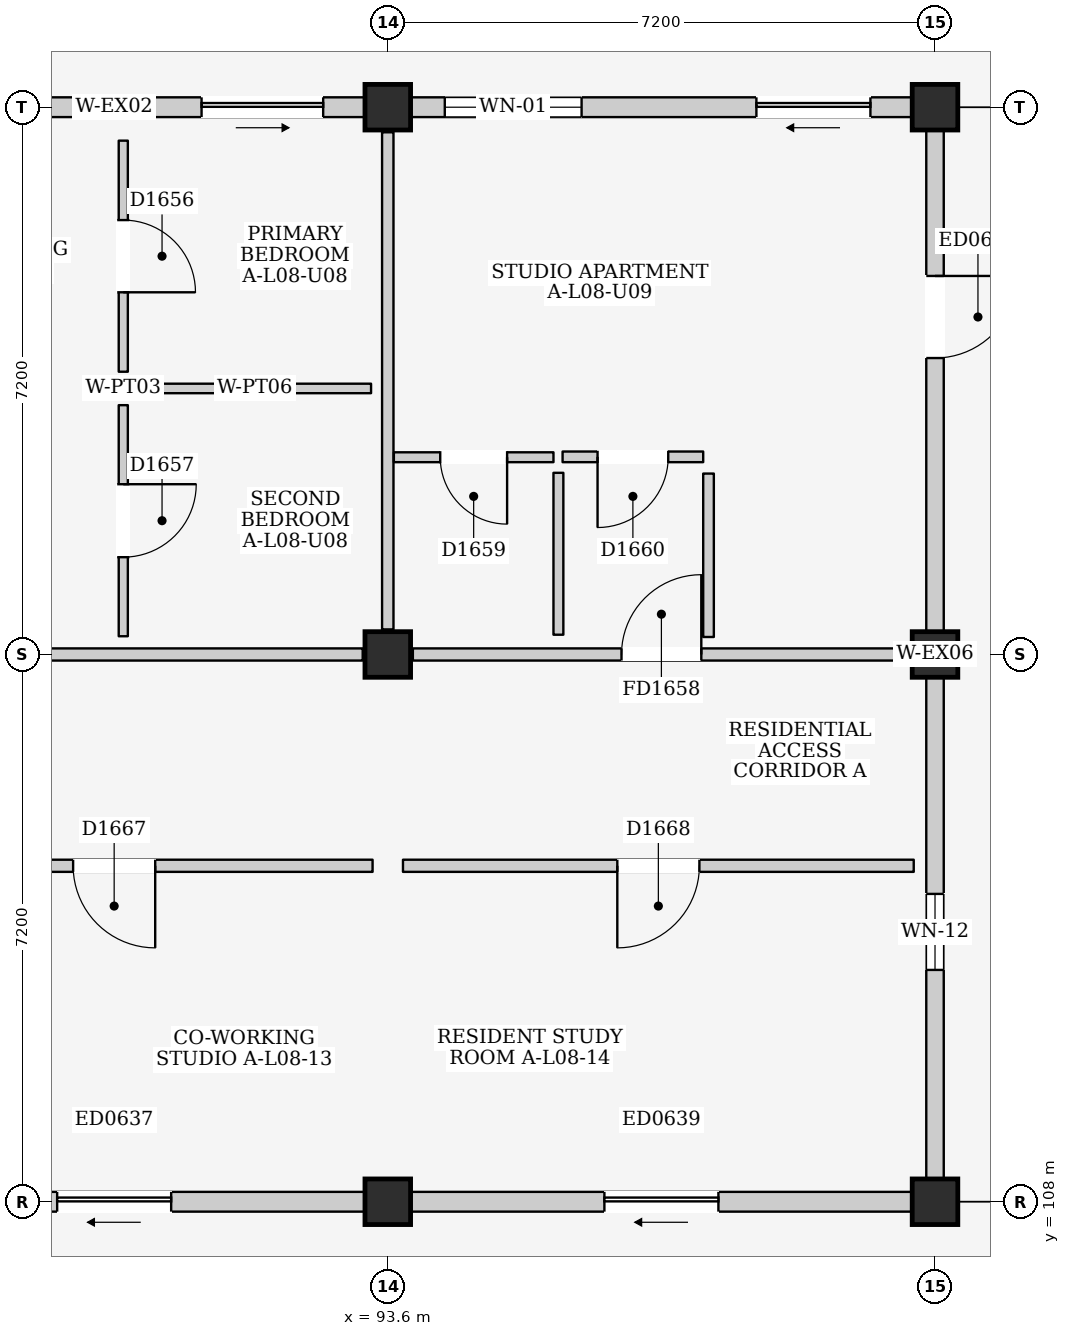
"""IFC4 building model, lengths in metres.
Left out: names, types, materials, properties, quantities, classifications, styles, units other than length and angle.
Written with IfcOpenShell. Run it as: python <this file> out.ifc"""

import sys

from ifc_helpers import new_model, si_unit, direction, frame, frame_2d, origin, origin_2d, place, context, subcontext, project, spatial, rectangle, extrude, element, fill, save


model = new_model("IFC4")
c1 = context("Model", 3, precision=1e-05, world=origin(), true_north=direction((0.0, 1.0)))
c2 = subcontext(c1, "Body", "Model", "MODEL_VIEW")
j1 = project(units=[si_unit("LENGTHUNIT", "METRE"), si_unit("PLANEANGLEUNIT", "RADIAN")], contexts=[c1])
p1 = place(None, origin())
s1 = spatial("IfcSite", under=j1, at=p1, CompositionType="ELEMENT")
p2 = place(p1, origin())
s2 = spatial("IfcBuilding", under=s1, at=p2, CompositionType="ELEMENT")
p3 = place(p2, frame((0.0, 0.0, 28.3)))
s3 = spatial("IfcBuildingStorey", under=s2, at=p3, CompositionType="ELEMENT", Elevation=28.3)
for number, where, z_axis, x_axis in (
    (1, (93.6, 108.0, 0.0), (0.0, 0.0, 1.0), (1.0, 0.0, 0.0)),
    (2, (93.6, 115.2, 0.0), (0.0, 0.0, 1.0), (1.0, 0.0, 0.0)),
    (3, (93.6, 122.4, 0.0), (0.0, 0.0, 1.0), (1.0, 0.0, 0.0)),
    (4, (100.8, 108.0, 0.0), (0.0, 0.0, 1.0), (1.0, 0.0, 0.0)),
    (5, (100.8, 115.2, 0.0), (0.0, 0.0, 1.0), (1.0, 0.0, 0.0)),
    (6, (100.8, 122.4, 0.0), (0.0, 0.0, 1.0), (1.0, 0.0, 0.0)),
):
    element("IfcColumn", number, at=place(p3, frame(where, z_axis=z_axis, x_axis=x_axis)), inside=s3, PredefinedType="COLUMN", context=c2, shape_type="SweptSolid", body=[
        extrude(rectangle(XDim=0.6, YDim=0.6, at=origin_2d()), origin(), (0.0, 0.0, 1.0), 3.2),
    ])
p4 = place(p3, frame((86.7, 122.4, 0.0), z_axis=(0.0, 0.0, 1.0), x_axis=(1.0, 0.0, 0.0)))
e7 = element("IfcWall", 7, at=p4, inside=s3, PredefinedType="ELEMENTEDWALL", context=c2, shape_type="SweptSolid", body=[
    extrude(rectangle(XDim=6.6, YDim=0.26, at=frame_2d((3.3, 0.0))), origin(), (0.0, 0.0, 1.0), 2.485),
])
p5 = place(p4, frame((4.45, 0.0, 0.0)))
e8 = element("IfcOpeningElement", 8, at=p5, cuts=e7, PredefinedType="OPENING", context=c2, shape_type="SweptSolid", body=[
    extrude(rectangle(XDim=1.6, YDim=2.12, at=frame_2d((0.8, 1.06))), frame((0.0, 0.145, 0.0), z_axis=(0.0, -1.0, 0.0), x_axis=(1.0, 0.0, 0.0)), (0.0, 0.0, 1.0), 0.29),
])
p6 = place(p4, frame((0.45, 0.0, 0.825)))
e9 = element("IfcOpeningElement", 9, at=p6, cuts=e7, PredefinedType="OPENING", context=c2, shape_type="SweptSolid", body=[
    extrude(rectangle(XDim=1.75, YDim=1.55, at=frame_2d((0.875, 0.775))), frame((0.0, 0.145, 0.0), z_axis=(0.0, -1.0, 0.0), x_axis=(1.0, 0.0, 0.0)), (0.0, 0.0, 1.0), 0.29),
])
p7 = place(p3, frame((86.7, 108.0, 0.0), z_axis=(0.0, 0.0, 1.0), x_axis=(1.0, 0.0, 0.0)))
e10 = element("IfcWall", 10, at=p7, inside=s3, PredefinedType="ELEMENTEDWALL", context=c2, shape_type="SweptSolid", body=[
    extrude(rectangle(XDim=6.6, YDim=0.26, at=frame_2d((3.3, 0.0))), origin(), (0.0, 0.0, 1.0), 2.285),
])
p8 = place(p7, frame((2.55, 0.0, 0.0)))
e11 = element("IfcOpeningElement", 11, at=p8, cuts=e10, PredefinedType="OPENING", context=c2, shape_type="SweptSolid", body=[
    extrude(rectangle(XDim=1.5, YDim=2.12, at=frame_2d((0.75, 1.06))), frame((0.0, 0.145, 0.0), z_axis=(0.0, -1.0, 0.0), x_axis=(1.0, 0.0, 0.0)), (0.0, 0.0, 1.0), 0.29),
])
p9 = place(p3, frame((93.9, 122.4, 0.0), z_axis=(0.0, 0.0, 1.0), x_axis=(1.0, 0.0, 0.0)))
e12 = element("IfcWall", 12, at=p9, inside=s3, PredefinedType="ELEMENTEDWALL", context=c2, shape_type="SweptSolid", body=[
    extrude(rectangle(XDim=6.6, YDim=0.26, at=frame_2d((3.3, 0.0))), origin(), (0.0, 0.0, 1.0), 2.485),
])
p10 = place(p9, frame((4.55, 0.0, 0.0)))
e13 = element("IfcOpeningElement", 13, at=p10, cuts=e12, PredefinedType="OPENING", context=c2, shape_type="SweptSolid", body=[
    extrude(rectangle(XDim=1.5, YDim=2.12, at=frame_2d((0.75, 1.06))), frame((0.0, 0.145, 0.0), z_axis=(0.0, -1.0, 0.0), x_axis=(1.0, 0.0, 0.0)), (0.0, 0.0, 1.0), 0.29),
])
p11 = place(p9, frame((0.45, 0.0, 0.875)))
e14 = element("IfcOpeningElement", 14, at=p11, cuts=e12, PredefinedType="OPENING", context=c2, shape_type="SweptSolid", body=[
    extrude(rectangle(XDim=1.8, YDim=1.5, at=frame_2d((0.9, 0.75))), frame((0.0, 0.145, 0.0), z_axis=(0.0, -1.0, 0.0), x_axis=(1.0, 0.0, 0.0)), (0.0, 0.0, 1.0), 0.29),
])
p12 = place(p3, frame((93.9, 108.0, 0.0), z_axis=(0.0, 0.0, 1.0), x_axis=(1.0, 0.0, 0.0)))
e15 = element("IfcWall", 15, at=p12, inside=s3, PredefinedType="ELEMENTEDWALL", context=c2, shape_type="SweptSolid", body=[
    extrude(rectangle(XDim=6.6, YDim=0.26, at=frame_2d((3.3, 0.0))), origin(), (0.0, 0.0, 1.0), 2.285),
])
p13 = place(p12, frame((2.55, 0.0, 0.0)))
e16 = element("IfcOpeningElement", 16, at=p13, cuts=e15, PredefinedType="OPENING", context=c2, shape_type="SweptSolid", body=[
    extrude(rectangle(XDim=1.5, YDim=2.12, at=frame_2d((0.75, 1.06))), frame((0.0, 0.145, 0.0), z_axis=(0.0, -1.0, 0.0), x_axis=(1.0, 0.0, 0.0)), (0.0, 0.0, 1.0), 0.29),
])
p14 = place(p3, frame((100.8, 108.3, 0.0), z_axis=(0.0, 0.0, 1.0), x_axis=(0.0, 1.0, 0.0)))
e17 = element("IfcWall", 17, at=p14, inside=s3, PredefinedType="ELEMENTEDWALL", context=c2, shape_type="SweptSolid", body=[
    extrude(rectangle(XDim=6.6, YDim=0.23, at=frame_2d((3.3, 0.0))), origin(), (0.0, 0.0, 1.0), 2.435),
])
p15 = place(p14, frame((2.75, 0.0, 1.1)))
e18 = element("IfcOpeningElement", 18, at=p15, cuts=e17, PredefinedType="OPENING", context=c2, shape_type="SweptSolid", body=[
    extrude(rectangle(XDim=1.0, YDim=0.9, at=frame_2d((0.5, 0.45))), frame((0.0, 0.13, 0.0), z_axis=(0.0, -1.0, 0.0), x_axis=(1.0, 0.0, 0.0)), (0.0, 0.0, 1.0), 0.26),
])
p16 = place(p3, frame((100.8, 115.5, 0.0), z_axis=(0.0, 0.0, 1.0), x_axis=(0.0, 1.0, 0.0)))
e19 = element("IfcWall", 19, at=p16, inside=s3, PredefinedType="ELEMENTEDWALL", context=c2, shape_type="SweptSolid", body=[
    extrude(rectangle(XDim=6.6, YDim=0.23, at=frame_2d((3.3, 0.0))), origin(), (0.0, 0.0, 1.0), 2.435),
])
p17 = place(p16, frame((3.6, 0.0, 0.0)))
e20 = element("IfcOpeningElement", 20, at=p17, cuts=e19, PredefinedType="OPENING", context=c2, shape_type="SweptSolid", body=[
    extrude(rectangle(XDim=1.08, YDim=2.12, at=frame_2d((0.54, 1.06))), frame((0.0, 0.13, 0.0), z_axis=(0.0, -1.0, 0.0), x_axis=(1.0, 0.0, 0.0)), (0.0, 0.0, 1.0), 0.26),
])
p18 = place(p3, frame((86.73, 115.2, 0.0), z_axis=(0.0, 0.0, 1.0), x_axis=(1.0, 0.0, 0.0)))
e21 = element("IfcWall", 21, at=p18, inside=s3, PredefinedType="PARTITIONING", context=c2, shape_type="SweptSolid", body=[
    extrude(rectangle(XDim=6.54, YDim=0.16, at=frame_2d((3.27, 0.0))), origin(), (0.0, 0.0, 1.0), 2.285),
])
p19 = place(p3, frame((93.6, 115.53, 0.0), z_axis=(0.0, 0.0, 1.0), x_axis=(0.0, 1.0, 0.0)))
e22 = element("IfcWall", 22, at=p19, inside=s3, PredefinedType="PARTITIONING", context=c2, shape_type="SweptSolid", body=[
    extrude(rectangle(XDim=6.54, YDim=0.15, at=frame_2d((3.27, 0.0))), origin(), (0.0, 0.0, 1.0), 2.435),
])
p20 = place(p3, frame((90.12, 118.92, 0.0), z_axis=(0.0, 0.0, 1.0), x_axis=(0.0, 1.0, 0.0)))
e23 = element("IfcWall", 23, at=p20, inside=s3, PredefinedType="PARTITIONING", context=c2, shape_type="SweptSolid", body=[
    extrude(rectangle(XDim=3.04, YDim=0.12, at=frame_2d((1.52, 0.0))), origin(), (0.0, 0.0, 1.0), 2.95),
])
p21 = place(p20, frame((1.045, 0.0, 0.0)))
e24 = element("IfcOpeningElement", 24, at=p21, cuts=e23, PredefinedType="OPENING", context=c2, shape_type="SweptSolid", body=[
    extrude(rectangle(XDim=0.95, YDim=2.15, at=frame_2d((0.475, 1.075))), frame((0.0, 0.075, 0.0), z_axis=(0.0, -1.0, 0.0), x_axis=(1.0, 0.0, 0.0)), (0.0, 0.0, 1.0), 0.15),
])
p22 = place(p3, frame((90.32, 118.7, 0.0), z_axis=(0.0, 0.0, 1.0), x_axis=(1.0, 0.0, 0.0)))
e25 = element("IfcWall", 25, at=p22, inside=s3, PredefinedType="PARTITIONING", context=c2, shape_type="SweptSolid", body=[
    extrude(rectangle(XDim=3.06, YDim=0.125, at=frame_2d((1.53, 0.0))), origin(), (0.0, 0.0, 1.0), 2.95),
])
p23 = place(p3, frame((90.12, 115.44, 0.0), z_axis=(0.0, 0.0, 1.0), x_axis=(0.0, 1.0, 0.0)))
e26 = element("IfcWall", 26, at=p23, inside=s3, PredefinedType="PARTITIONING", context=c2, shape_type="SweptSolid", body=[
    extrude(rectangle(XDim=3.04, YDim=0.12, at=frame_2d((1.52, 0.0))), origin(), (0.0, 0.0, 1.0), 2.95),
])
p24 = place(p23, frame((1.04, 0.0, 0.0)))
e27 = element("IfcOpeningElement", 27, at=p24, cuts=e26, PredefinedType="OPENING", context=c2, shape_type="SweptSolid", body=[
    extrude(rectangle(XDim=0.96, YDim=2.15, at=frame_2d((0.48, 1.075))), frame((0.0, 0.075, 0.0), z_axis=(0.0, -1.0, 0.0), x_axis=(1.0, 0.0, 0.0)), (0.0, 0.0, 1.0), 0.15),
])
p25 = place(p3, frame((93.93, 115.2, 0.0), z_axis=(0.0, 0.0, 1.0), x_axis=(1.0, 0.0, 0.0)))
e28 = element("IfcWall", 28, at=p25, inside=s3, PredefinedType="PARTITIONING", context=c2, shape_type="SweptSolid", body=[
    extrude(rectangle(XDim=6.54, YDim=0.16, at=frame_2d((3.27, 0.0))), origin(), (0.0, 0.0, 1.0), 2.285),
])
p26 = place(p25, frame((2.745, 0.0, 0.0)))
e29 = element("IfcOpeningElement", 29, at=p26, cuts=e28, PredefinedType="OPENING", context=c2, shape_type="SweptSolid", body=[
    extrude(rectangle(XDim=1.05, YDim=2.15, at=frame_2d((0.525, 1.075))), frame((0.0, 0.095, 0.0), z_axis=(0.0, -1.0, 0.0), x_axis=(1.0, 0.0, 0.0)), (0.0, 0.0, 1.0), 0.19),
])
p27 = place(p3, frame((93.68, 117.795, 0.0), z_axis=(0.0, 0.0, 1.0), x_axis=(1.0, 0.0, 0.0)))
e30 = element("IfcWall", 30, at=p27, inside=s3, PredefinedType="PARTITIONING", context=c2, shape_type="SweptSolid", body=[
    extrude(rectangle(XDim=2.1, YDim=0.13, at=frame_2d((1.05, 0.0))), origin(), (0.0, 0.0, 1.0), 2.95),
])
p28 = place(p27, frame((0.61, 0.0, 0.0)))
e31 = element("IfcOpeningElement", 31, at=p28, cuts=e30, PredefinedType="OPENING", context=c2, shape_type="SweptSolid", body=[
    extrude(rectangle(XDim=0.88, YDim=2.1, at=frame_2d((0.44, 1.05))), frame((0.0, 0.08, 0.0), z_axis=(0.0, -1.0, 0.0), x_axis=(1.0, 0.0, 0.0)), (0.0, 0.0, 1.0), 0.16),
])
p29 = place(p3, frame((95.845, 115.46, 0.0), z_axis=(0.0, 0.0, 1.0), x_axis=(0.0, 1.0, 0.0)))
e32 = element("IfcWall", 32, at=p29, inside=s3, PredefinedType="PARTITIONING", context=c2, shape_type="SweptSolid", body=[
    extrude(rectangle(XDim=2.13, YDim=0.13, at=frame_2d((1.065, 0.0))), origin(), (0.0, 0.0, 1.0), 2.95),
])
p30 = place(p3, frame((95.9, 117.8, 0.0), z_axis=(0.0, 0.0, 1.0), x_axis=(1.0, 0.0, 0.0)))
e33 = element("IfcWall", 33, at=p30, inside=s3, PredefinedType="PARTITIONING", context=c2, shape_type="SweptSolid", body=[
    extrude(rectangle(XDim=1.85, YDim=0.14, at=frame_2d((0.925, 0.0))), origin(), (0.0, 0.0, 1.0), 2.95),
])
p31 = place(p30, frame((0.46, 0.0, 0.0)))
e34 = element("IfcOpeningElement", 34, at=p31, cuts=e33, PredefinedType="OPENING", context=c2, shape_type="SweptSolid", body=[
    extrude(rectangle(XDim=0.93, YDim=2.14, at=frame_2d((0.465, 1.07))), frame((0.0, 0.085, 0.0), z_axis=(0.0, -1.0, 0.0), x_axis=(1.0, 0.0, 0.0)), (0.0, 0.0, 1.0), 0.17),
])
p32 = place(p3, frame((97.82, 115.43, 0.0), z_axis=(0.0, 0.0, 1.0), x_axis=(0.0, 1.0, 0.0)))
e35 = element("IfcWall", 35, at=p32, inside=s3, PredefinedType="PARTITIONING", context=c2, shape_type="SweptSolid", body=[
    extrude(rectangle(XDim=2.15, YDim=0.14, at=frame_2d((1.075, 0.0))), origin(), (0.0, 0.0, 1.0), 2.95),
])
p33 = place(p3, frame((86.6, 112.42, 0.0), z_axis=(0.0, 0.0, 1.0), x_axis=(1.0, 0.0, 0.0)))
e36 = element("IfcWall", 36, at=p33, inside=s3, PredefinedType="PARTITIONING", context=c2, shape_type="SweptSolid", body=[
    extrude(rectangle(XDim=6.8, YDim=0.16, at=frame_2d((3.4, 0.0))), origin(), (0.0, 0.0, 1.0), 2.95),
])
p34 = place(p33, frame((2.86, 0.0, 0.0)))
e37 = element("IfcOpeningElement", 37, at=p34, cuts=e36, PredefinedType="OPENING", context=c2, shape_type="SweptSolid", body=[
    extrude(rectangle(XDim=1.08, YDim=2.22, at=frame_2d((0.54, 1.11))), frame((0.0, 0.095, 0.0), z_axis=(0.0, -1.0, 0.0), x_axis=(1.0, 0.0, 0.0)), (0.0, 0.0, 1.0), 0.19),
])
p35 = place(p3, frame((93.8, 112.42, 0.0), z_axis=(0.0, 0.0, 1.0), x_axis=(1.0, 0.0, 0.0)))
e38 = element("IfcWall", 38, at=p35, inside=s3, PredefinedType="PARTITIONING", context=c2, shape_type="SweptSolid", body=[
    extrude(rectangle(XDim=6.72, YDim=0.16, at=frame_2d((3.36, 0.0))), origin(), (0.0, 0.0, 1.0), 2.95),
])
p36 = place(p35, frame((2.82, 0.0, 0.0)))
e39 = element("IfcOpeningElement", 39, at=p36, cuts=e38, PredefinedType="OPENING", context=c2, shape_type="SweptSolid", body=[
    extrude(rectangle(XDim=1.08, YDim=2.22, at=frame_2d((0.54, 1.11))), frame((0.0, 0.095, 0.0), z_axis=(0.0, -1.0, 0.0), x_axis=(1.0, 0.0, 0.0)), (0.0, 0.0, 1.0), 0.19),
])
p37 = place(p5, frame((1.6, 0.0, 0.0), z_axis=(0.0, 0.0, 1.0), x_axis=(-1.0, 0.0, 0.0)))
e40 = element("IfcDoor", 40, at=p37, inside=s3, OperationType="SLIDING_TO_RIGHT", PredefinedType="DOOR", context=c2, shape_type="SweptSolid", body=[
    extrude(rectangle(XDim=1.6, YDim=2.12, at=frame_2d((0.8, 1.06))), frame((0.0, 0.025, 0.0), z_axis=(0.0, -1.0, 0.0), x_axis=(1.0, 0.0, 0.0)), (0.0, 0.0, 1.0), 0.05),
])
fill(e8, e40)
p38 = place(p8, frame((1.5, 0.0, 0.0), z_axis=(0.0, 0.0, 1.0), x_axis=(-1.0, 0.0, 0.0)))
e41 = element("IfcDoor", 41, at=p38, inside=s3, OperationType="SLIDING_TO_LEFT", PredefinedType="DOOR", context=c2, shape_type="SweptSolid", body=[
    extrude(rectangle(XDim=1.5, YDim=2.12, at=frame_2d((0.75, 1.06))), frame((0.0, 0.025, 0.0), z_axis=(0.0, -1.0, 0.0), x_axis=(1.0, 0.0, 0.0)), (0.0, 0.0, 1.0), 0.05),
])
fill(e11, e41)
p39 = place(p10, frame((1.5, 0.0, 0.0), z_axis=(0.0, 0.0, 1.0), x_axis=(-1.0, 0.0, 0.0)))
e42 = element("IfcDoor", 42, at=p39, inside=s3, OperationType="SLIDING_TO_LEFT", PredefinedType="DOOR", context=c2, shape_type="SweptSolid", body=[
    extrude(rectangle(XDim=1.5, YDim=2.12, at=frame_2d((0.75, 1.06))), frame((0.0, 0.025, 0.0), z_axis=(0.0, -1.0, 0.0), x_axis=(1.0, 0.0, 0.0)), (0.0, 0.0, 1.0), 0.05),
])
fill(e13, e42)
p40 = place(p11, origin())
e43 = element("IfcWindow", 43, at=p40, inside=s3, PartitioningType="DOUBLE_PANEL_VERTICAL", PredefinedType="WINDOW", context=c2, shape_type="SweptSolid", body=[
    extrude(rectangle(XDim=1.8, YDim=1.5, at=frame_2d((0.9, 0.75))), frame((0.0, 0.03, 0.0), z_axis=(0.0, -1.0, 0.0), x_axis=(1.0, 0.0, 0.0)), (0.0, 0.0, 1.0), 0.06),
])
fill(e14, e43)
p41 = place(p13, frame((1.5, 0.0, 0.0), z_axis=(0.0, 0.0, 1.0), x_axis=(-1.0, 0.0, 0.0)))
e44 = element("IfcDoor", 44, at=p41, inside=s3, OperationType="SLIDING_TO_LEFT", PredefinedType="DOOR", context=c2, shape_type="SweptSolid", body=[
    extrude(rectangle(XDim=1.5, YDim=2.12, at=frame_2d((0.75, 1.06))), frame((0.0, 0.025, 0.0), z_axis=(0.0, -1.0, 0.0), x_axis=(1.0, 0.0, 0.0)), (0.0, 0.0, 1.0), 0.05),
])
fill(e16, e44)
p42 = place(p15, origin())
e45 = element("IfcWindow", 45, at=p42, inside=s3, PartitioningType="SINGLE_PANEL", PredefinedType="WINDOW", context=c2, shape_type="SweptSolid", body=[
    extrude(rectangle(XDim=1.0, YDim=0.9, at=frame_2d((0.5, 0.45))), frame((0.0, 0.03, 0.0), z_axis=(0.0, -1.0, 0.0), x_axis=(1.0, 0.0, 0.0)), (0.0, 0.0, 1.0), 0.06),
])
fill(e18, e45)
p43 = place(p17, frame((1.08, 0.0, 0.0), z_axis=(0.0, 0.0, 1.0), x_axis=(-1.0, 0.0, 0.0)))
e46 = element("IfcDoor", 46, at=p43, inside=s3, OperationType="SINGLE_SWING_LEFT", PredefinedType="DOOR", context=c2, shape_type="SweptSolid", body=[
    extrude(rectangle(XDim=1.08, YDim=2.12, at=frame_2d((0.54, 1.06))), frame((0.0, 0.025, 0.0), z_axis=(0.0, -1.0, 0.0), x_axis=(1.0, 0.0, 0.0)), (0.0, 0.0, 1.0), 0.05),
])
fill(e20, e46)
p44 = place(p21, frame((0.95, 0.0, 0.0), z_axis=(0.0, 0.0, 1.0), x_axis=(-1.0, 0.0, 0.0)))
e47 = element("IfcDoor", 47, at=p44, inside=s3, OperationType="SINGLE_SWING_RIGHT", PredefinedType="DOOR", context=c2, shape_type="SweptSolid", body=[
    extrude(rectangle(XDim=0.95, YDim=2.15, at=frame_2d((0.475, 1.075))), frame((0.0, 0.025, 0.0), z_axis=(0.0, -1.0, 0.0), x_axis=(1.0, 0.0, 0.0)), (0.0, 0.0, 1.0), 0.05),
])
fill(e24, e47)
p45 = place(p24, frame((0.96, 0.0, 0.0), z_axis=(0.0, 0.0, 1.0), x_axis=(-1.0, 0.0, 0.0)))
e48 = element("IfcDoor", 48, at=p45, inside=s3, OperationType="SINGLE_SWING_LEFT", PredefinedType="DOOR", context=c2, shape_type="SweptSolid", body=[
    extrude(rectangle(XDim=0.96, YDim=2.15, at=frame_2d((0.48, 1.075))), frame((0.0, 0.025, 0.0), z_axis=(0.0, -1.0, 0.0), x_axis=(1.0, 0.0, 0.0)), (0.0, 0.0, 1.0), 0.05),
])
fill(e27, e48)
p46 = place(p26, origin())
e49 = element("IfcDoor", 49, at=p46, inside=s3, OperationType="SINGLE_SWING_RIGHT", PredefinedType="DOOR", context=c2, shape_type="SweptSolid", body=[
    extrude(rectangle(XDim=1.05, YDim=2.15, at=frame_2d((0.525, 1.075))), frame((0.0, 0.025, 0.0), z_axis=(0.0, -1.0, 0.0), x_axis=(1.0, 0.0, 0.0)), (0.0, 0.0, 1.0), 0.05),
])
fill(e29, e49)
p47 = place(p28, frame((0.88, 0.0, 0.0), z_axis=(0.0, 0.0, 1.0), x_axis=(-1.0, 0.0, 0.0)))
e50 = element("IfcDoor", 50, at=p47, inside=s3, OperationType="SINGLE_SWING_LEFT", PredefinedType="DOOR", context=c2, shape_type="SweptSolid", body=[
    extrude(rectangle(XDim=0.88, YDim=2.1, at=frame_2d((0.44, 1.05))), frame((0.0, 0.025, 0.0), z_axis=(0.0, -1.0, 0.0), x_axis=(1.0, 0.0, 0.0)), (0.0, 0.0, 1.0), 0.05),
])
fill(e31, e50)
p48 = place(p31, frame((0.93, 0.0, 0.0), z_axis=(0.0, 0.0, 1.0), x_axis=(-1.0, 0.0, 0.0)))
e51 = element("IfcDoor", 51, at=p48, inside=s3, OperationType="SINGLE_SWING_RIGHT", PredefinedType="DOOR", context=c2, shape_type="SweptSolid", body=[
    extrude(rectangle(XDim=0.93, YDim=2.14, at=frame_2d((0.465, 1.07))), frame((0.0, 0.025, 0.0), z_axis=(0.0, -1.0, 0.0), x_axis=(1.0, 0.0, 0.0)), (0.0, 0.0, 1.0), 0.05),
])
fill(e34, e51)
p49 = place(p34, frame((1.08, 0.0, 0.0), z_axis=(0.0, 0.0, 1.0), x_axis=(-1.0, 0.0, 0.0)))
e52 = element("IfcDoor", 52, at=p49, inside=s3, OperationType="SINGLE_SWING_LEFT", PredefinedType="DOOR", context=c2, shape_type="SweptSolid", body=[
    extrude(rectangle(XDim=1.08, YDim=2.22, at=frame_2d((0.54, 1.11))), frame((0.0, 0.025, 0.0), z_axis=(0.0, -1.0, 0.0), x_axis=(1.0, 0.0, 0.0)), (0.0, 0.0, 1.0), 0.05),
])
fill(e37, e52)
p50 = place(p36, frame((1.08, 0.0, 0.0), z_axis=(0.0, 0.0, 1.0), x_axis=(-1.0, 0.0, 0.0)))
e53 = element("IfcDoor", 53, at=p50, inside=s3, OperationType="SINGLE_SWING_RIGHT", PredefinedType="DOOR", context=c2, shape_type="SweptSolid", body=[
    extrude(rectangle(XDim=1.08, YDim=2.22, at=frame_2d((0.54, 1.11))), frame((0.0, 0.025, 0.0), z_axis=(0.0, -1.0, 0.0), x_axis=(1.0, 0.0, 0.0)), (0.0, 0.0, 1.0), 0.05),
])
fill(e39, e53)
save(model, sys.argv[1])
